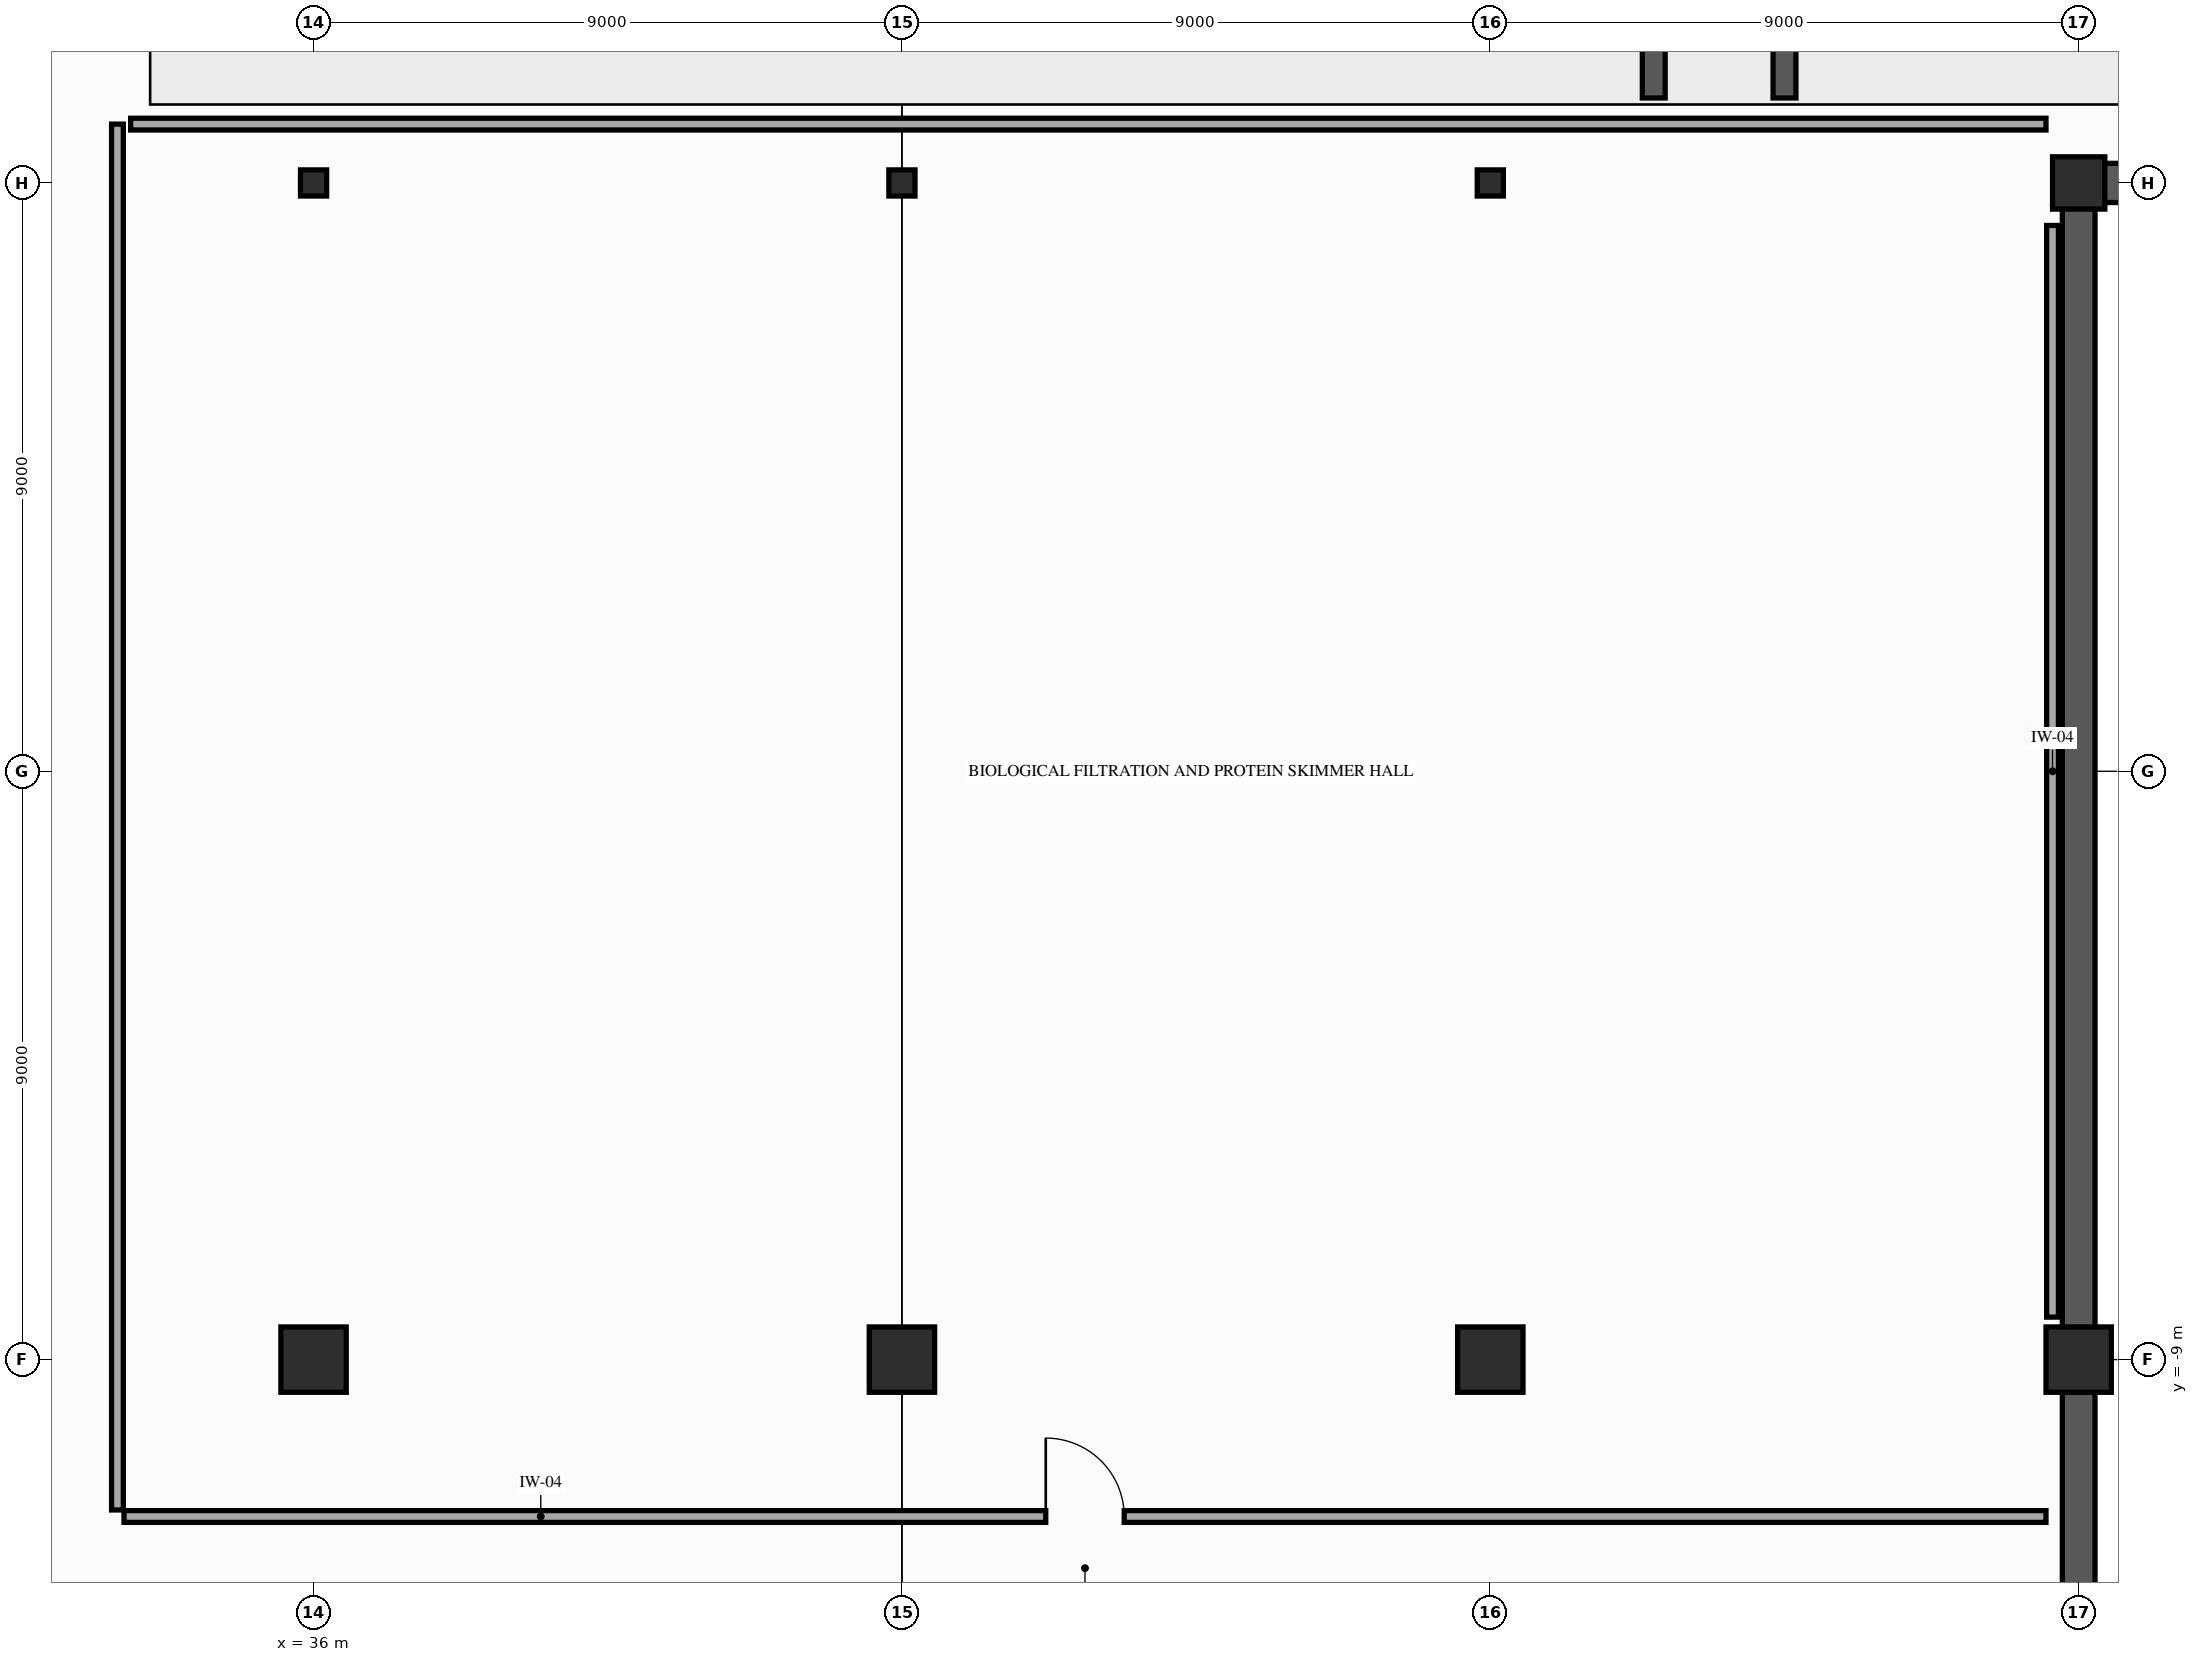
"""IFC4 building model, lengths in metres.
Left out: names, types, materials, properties, quantities, classifications, styles, units other than length and angle.
Written with IfcOpenShell. Run it as: python <this file> out.ifc"""

import sys

from ifc_helpers import new_model, si_unit, direction, frame, frame_2d, origin, origin_2d, place, context, subcontext, project, spatial, rectangle, i_section, extrude, element, fill, save


model = new_model("IFC4")
c1 = context("Model", 3, precision=1e-05, world=origin(), true_north=direction((0.0, 1.0)))
c2 = subcontext(c1, "Body", "Model", "MODEL_VIEW")
j1 = project(units=[si_unit("LENGTHUNIT", "METRE"), si_unit("PLANEANGLEUNIT", "RADIAN")], contexts=[c1])
p1 = place(None, origin())
s1 = spatial("IfcSite", under=j1, at=p1, CompositionType="ELEMENT")
p2 = place(p1, origin())
s2 = spatial("IfcBuilding", under=s1, at=p2, CompositionType="ELEMENT")
p3 = place(p2, frame((0.0, 0.0, -6.0)))
s3 = spatial("IfcBuildingStorey", under=s2, at=p3, CompositionType="ELEMENT", Elevation=-6.0)
for number, where, z_axis, x_axis in (
    (1, (56.5, 10.3, 0.0), (0.0, 0.0, 1.0), (0.0, 1.0, 0.0)),
    (2, (58.5, 10.3, 0.0), (0.0, 0.0, 1.0), (0.0, 1.0, 0.0)),
):
    element("IfcWall", number, at=place(p3, frame(where, z_axis=z_axis, x_axis=x_axis)), inside=s3, PredefinedType="SHEAR", context=c2, shape_type="SweptSolid", body=[
        extrude(rectangle(XDim=6.3, YDim=0.35, at=frame_2d((3.15, 0.0))), origin(), (0.0, 0.0, 1.0), 2.7),
    ])
for number, where, z_axis, x_axis in (
    (3, (36.0, -9.0, 0.0), (0.0, 0.0, 1.0), (1.0, 0.0, 0.0)),
    (4, (45.0, -9.0, 0.0), (0.0, 0.0, 1.0), (1.0, 0.0, 0.0)),
    (5, (54.0, -9.0, 0.0), (0.0, 0.0, 1.0), (1.0, 0.0, 0.0)),
    (6, (63.0, -9.0, 0.0), (0.0, 0.0, 1.0), (1.0, 0.0, 0.0)),
):
    element("IfcColumn", number, at=place(p3, frame(where, z_axis=z_axis, x_axis=x_axis)), inside=s3, PredefinedType="COLUMN", context=c2, shape_type="SweptSolid", body=[
        extrude(rectangle(XDim=1.0, YDim=1.0, at=origin_2d()), origin(), (0.0, 0.0, 1.0), 6.0),
    ])
for number, where, z_axis, x_axis in (
    (7, (36.0, 9.0, 0.0), (0.0, 0.0, 1.0), (1.0, 0.0, 0.0)),
    (8, (45.0, 9.0, 0.0), (0.0, 0.0, 1.0), (1.0, 0.0, 0.0)),
    (9, (54.0, 9.0, 0.0), (0.0, 0.0, 1.0), (1.0, 0.0, 0.0)),
):
    element("IfcColumn", number, at=place(p3, frame(where, z_axis=z_axis, x_axis=x_axis)), inside=s3, PredefinedType="COLUMN", context=c2, shape_type="SweptSolid", body=[
        extrude(i_section(OverallWidth=0.4, OverallDepth=0.4, WebThickness=0.013, FlangeThickness=0.021, FilletRadius=0.022, at=origin_2d()), origin(), (0.0, 0.0, 1.0), 6.0),
    ])
p4 = place(p3, frame((63.0, 9.0, 0.0), z_axis=(0.0, 0.0, 1.0), x_axis=(1.0, 0.0, 0.0)))
e10 = element("IfcColumn", 10, at=p4, inside=s3, PredefinedType="COLUMN", context=c2, shape_type="SweptSolid", body=[
    extrude(rectangle(XDim=0.8, YDim=0.8, at=origin_2d()), origin(), (0.0, 0.0, 1.0), 6.0),
])
p5 = place(p3, frame((63.0, -17.7, 0.0), z_axis=(0.0, 0.0, 1.0), x_axis=(0.0, 1.0, 0.0)))
e11 = element("IfcWall", 11, at=p5, inside=s3, PredefinedType="USERDEFINED", context=c2, shape_type="SweptSolid", body=[
    extrude(rectangle(XDim=8.4, YDim=0.5, at=frame_2d((4.2, 0.0))), origin(), (0.0, 0.0, 1.0), 5.05),
])
p6 = place(p3, frame((63.0, -8.7, 0.0), z_axis=(0.0, 0.0, 1.0), x_axis=(0.0, 1.0, 0.0)))
e12 = element("IfcWall", 12, at=p6, inside=s3, PredefinedType="USERDEFINED", context=c2, shape_type="SweptSolid", body=[
    extrude(rectangle(XDim=17.4, YDim=0.5, at=frame_2d((8.7, 0.0))), origin(), (0.0, 0.0, 1.0), 5.05),
])
p7 = place(p3, frame((63.3, 9.0, 0.0), z_axis=(0.0, 0.0, 1.0), x_axis=(1.0, 0.0, 0.0)))
e13 = element("IfcWall", 13, at=p7, inside=s3, PredefinedType="USERDEFINED", context=c2, shape_type="SweptSolid", body=[
    extrude(rectangle(XDim=8.4, YDim=0.6, at=frame_2d((4.2, 0.0))), origin(), (0.0, 0.0, 1.0), 5.05),
])
p8 = place(p3, frame((33.1, -11.4, 0.0), z_axis=(0.0, 0.0, 1.0), x_axis=(1.0, 0.0, 0.0)))
e14 = element("IfcWall", 14, at=p8, inside=s3, PredefinedType="PARTITIONING", context=c2, shape_type="SweptSolid", body=[
    extrude(rectangle(XDim=29.4, YDim=0.18, at=frame_2d((14.7, 0.0))), origin(), (0.0, 0.0, 1.0), 4.835),
])
p9 = place(p8, frame((14.1, 0.0, 0.0)))
e15 = element("IfcOpeningElement", 15, at=p9, cuts=e14, PredefinedType="OPENING", context=c2, shape_type="SweptSolid", body=[
    extrude(rectangle(XDim=1.2, YDim=2.2, at=frame_2d((0.6, 1.1))), frame((0.0, 0.1, 0.0), z_axis=(0.0, -1.0, 0.0), x_axis=(1.0, 0.0, 0.0)), (0.0, 0.0, 1.0), 0.2),
])
p10 = place(p3, frame((62.6, -8.35, 0.0), z_axis=(0.0, 0.0, 1.0), x_axis=(0.0, 1.0, 0.0)))
e16 = element("IfcWall", 16, at=p10, inside=s3, PredefinedType="PARTITIONING", context=c2, shape_type="SweptSolid", body=[
    extrude(rectangle(XDim=16.7, YDim=0.18, at=frame_2d((8.35, 0.0))), origin(), (0.0, 0.0, 1.0), 5.65),
])
p11 = place(p3, frame((62.5, 9.9, 0.0), z_axis=(0.0, 0.0, 1.0), x_axis=(-1.0, 0.0, 0.0)))
e17 = element("IfcWall", 17, at=p11, inside=s3, PredefinedType="PARTITIONING", context=c2, shape_type="SweptSolid", body=[
    extrude(rectangle(XDim=29.298, YDim=0.18, at=frame_2d((14.649, 0.0))), origin(), (0.0, 0.0, 1.0), 5.097),
])
p12 = place(p3, frame((33.0, 9.9, 0.0), z_axis=(0.0, 0.0, 1.0), x_axis=(0.0, -1.0, 0.0)))
e18 = element("IfcWall", 18, at=p12, inside=s3, PredefinedType="PARTITIONING", context=c2, shape_type="SweptSolid", body=[
    extrude(rectangle(XDim=21.2, YDim=0.18, at=frame_2d((10.6, 0.0))), origin(), (0.0, 0.0, 1.0), 4.785),
])
p13 = place(p9, origin())
e19 = element("IfcDoor", 19, at=p13, inside=s3, OperationType="SINGLE_SWING_LEFT", PredefinedType="DOOR", context=c2, shape_type="SweptSolid", body=[
    extrude(rectangle(XDim=1.2, YDim=2.2, at=frame_2d((0.6, 1.1))), frame((0.0, 0.025, 0.0), z_axis=(0.0, -1.0, 0.0), x_axis=(1.0, 0.0, 0.0)), (0.0, 0.0, 1.0), 0.05),
])
fill(e15, e19)
p14 = place(p3, frame((61.8, -7.8, 0.0), z_axis=(0.0, 0.0, 1.0), x_axis=(0.0, 1.0, 0.0)))
e20 = element("IfcWall", 20, at=p14, inside=s3, PredefinedType="SOLIDWALL", context=c2, shape_type="SweptSolid", body=[
    extrude(rectangle(XDim=2.0, YDim=0.35, at=frame_2d((1.0, 0.0))), origin(), (0.0, 0.0, 1.0), 5.801),
])
save(model, sys.argv[1])
